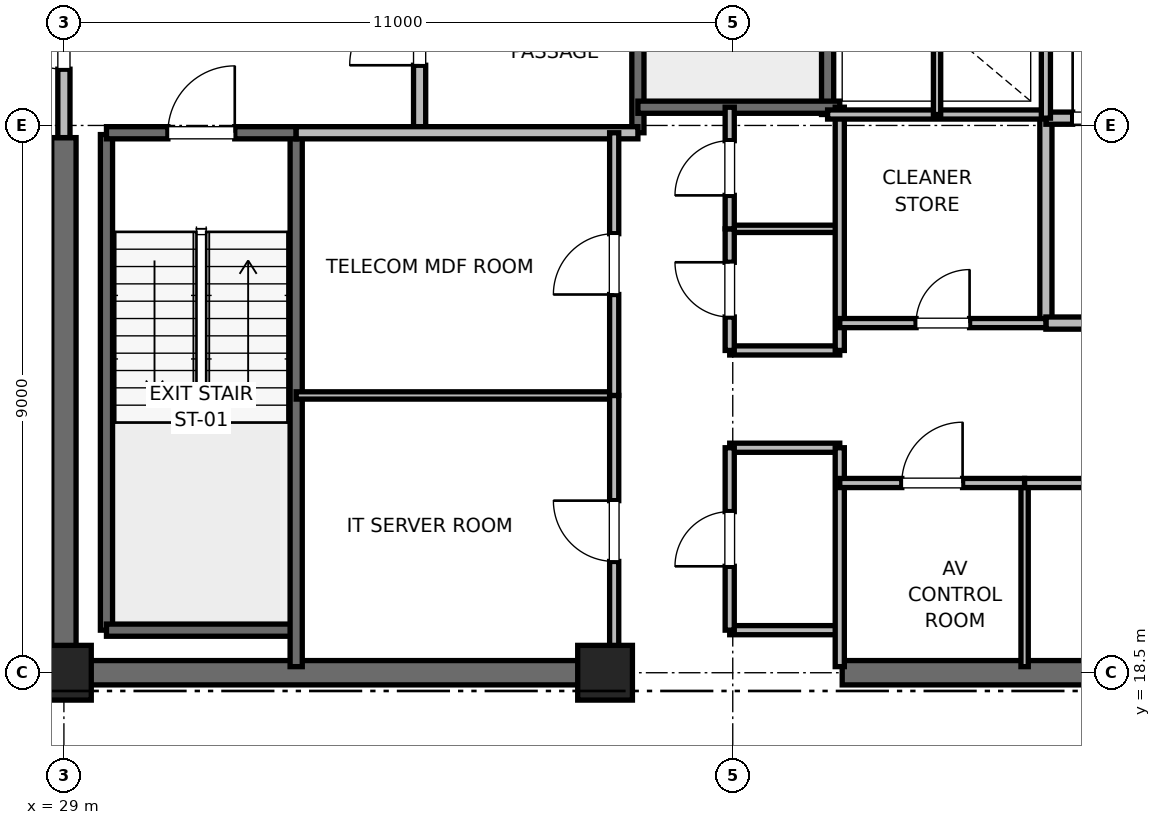
"""IFC4 building model, lengths in metres.
Left out: names, types, materials, properties, quantities, classifications, styles, units other than length and angle.
Written with IfcOpenShell. Run it as: python <this file> out.ifc"""

import sys

from ifc_helpers import new_model, si_unit, direction, frame, frame_2d, origin, origin_2d, place, context, subcontext, project, spatial, rectangle, extrude, element, fill, save


model = new_model("IFC4")
c1 = context("Model", 3, precision=1e-05, world=origin(), true_north=direction((0.0, 1.0)))
c2 = subcontext(c1, "Body", "Model", "MODEL_VIEW")
j1 = project(units=[si_unit("LENGTHUNIT", "METRE"), si_unit("PLANEANGLEUNIT", "RADIAN")], contexts=[c1])
p1 = place(None, origin())
s1 = spatial("IfcSite", under=j1, at=p1, CompositionType="ELEMENT")
p2 = place(p1, origin())
s2 = spatial("IfcBuilding", under=s1, at=p2, CompositionType="ELEMENT")
p3 = place(p2, frame((0.0, 0.0, 314.8)))
s3 = spatial("IfcBuildingStorey", under=s2, at=p3, CompositionType="ELEMENT", Elevation=314.8)
for number, where, z_axis, x_axis in (
    (1, (29.0, 18.5, 0.0), (0.0, 0.0, 1.0), (1.0, 0.0, 0.0)),
    (2, (37.9, 18.5, 0.0), (0.0, 0.0, 1.0), (1.0, 0.0, 0.0)),
):
    element("IfcColumn", number, at=place(p3, frame(where, z_axis=z_axis, x_axis=x_axis)), inside=s3, PredefinedType="PILASTER", context=c2, shape_type="SweptSolid", body=[
        extrude(rectangle(XDim=0.9, YDim=0.9, at=origin_2d()), origin(), (0.0, 0.0, 1.0), 4.0),
    ])
for number, where, z_axis, x_axis in (
    (3, (29.0, 18.5, 0.0), (0.0, 0.0, 1.0), (1.0, 0.0, 0.0)),
    (4, (41.8, 18.5, 0.0), (0.0, 0.0, 1.0), (1.0, 0.0, 0.0)),
):
    element("IfcWall", number, at=place(p3, frame(where, z_axis=z_axis, x_axis=x_axis)), inside=s3, PredefinedType="SHEAR", context=c2, shape_type="SweptSolid", body=[
        extrude(rectangle(XDim=9.2, YDim=0.4, at=frame_2d((4.6, 0.0))), origin(), (0.0, 0.0, 1.0), 3.785),
    ])
p4 = place(p3, frame((29.0, 18.5, 0.0), z_axis=(0.0, 0.0, 1.0), x_axis=(0.0, 1.0, 0.0)))
e5 = element("IfcWall", 5, at=p4, inside=s3, PredefinedType="SHEAR", context=c2, shape_type="SweptSolid", body=[
    extrude(rectangle(XDim=8.8, YDim=0.4, at=frame_2d((4.4, 0.0))), origin(), (0.0, 0.0, 1.0), 3.785),
])
p5 = place(p3, frame((29.7, 19.2, 0.0), z_axis=(0.0, 0.0, 1.0), x_axis=(0.0, 1.0, 0.0)))
e6 = element("IfcWall", 6, at=p5, inside=s3, PredefinedType="SOLIDWALL", context=c2, shape_type="SweptSolid", body=[
    extrude(rectangle(XDim=8.15, YDim=0.2, at=frame_2d((4.075, 0.0))), origin(), (0.0, 0.0, 1.0), 3.785),
])
p6 = place(p3, frame((29.7, 19.2, 0.0), z_axis=(0.0, 0.0, 1.0), x_axis=(1.0, 0.0, 0.0)))
e7 = element("IfcWall", 7, at=p6, inside=s3, PredefinedType="SOLIDWALL", context=c2, shape_type="SweptSolid", body=[
    extrude(rectangle(XDim=3.12, YDim=0.2, at=frame_2d((1.56, 0.0))), origin(), (0.0, 0.0, 1.0), 3.785),
])
p7 = place(p3, frame((32.82, 18.6, 0.0), z_axis=(0.0, 0.0, 1.0), x_axis=(0.0, 1.0, 0.0)))
e8 = element("IfcWall", 8, at=p7, inside=s3, PredefinedType="SOLIDWALL", context=c2, shape_type="SweptSolid", body=[
    extrude(rectangle(XDim=8.78, YDim=0.2, at=frame_2d((4.39, 0.0))), origin(), (0.0, 0.0, 1.0), 3.785),
])
p8 = place(p3, frame((29.7, 27.38, 0.0), z_axis=(0.0, 0.0, 1.0), x_axis=(1.0, 0.0, 0.0)))
e9 = element("IfcWall", 9, at=p8, inside=s3, PredefinedType="SOLIDWALL", context=c2, shape_type="SweptSolid", body=[
    extrude(rectangle(XDim=3.12, YDim=0.2, at=frame_2d((1.56, 0.0))), origin(), (0.0, 0.0, 1.0), 3.785),
])
p9 = place(p8, frame((1.01, 0.0, 0.0)))
e10 = element("IfcOpeningElement", 10, at=p9, cuts=e9, PredefinedType="OPENING", context=c2, shape_type="SweptSolid", body=[
    extrude(rectangle(XDim=1.1, YDim=2.15, at=frame_2d((0.55, 1.075))), frame((0.0, 0.1, 0.0), z_axis=(0.0, -1.0, 0.0), x_axis=(1.0, 0.0, 0.0)), (0.0, 0.0, 1.0), 0.2),
])
p10 = place(p3, frame((38.44, 27.38, 0.0), z_axis=(0.0, 0.0, 1.0), x_axis=(0.0, 1.0, 0.0)))
e11 = element("IfcWall", 11, at=p10, inside=s3, PredefinedType="SOLIDWALL", context=c2, shape_type="SweptSolid", body=[
    extrude(rectangle(XDim=8.87, YDim=0.2, at=frame_2d((4.435, 0.0))), origin(), (0.0, 0.0, 1.0), 3.785),
])
p11 = place(p3, frame((41.56, 27.68, 0.0), z_axis=(0.0, 0.0, 1.0), x_axis=(0.0, 1.0, 0.0)))
e12 = element("IfcWall", 12, at=p11, inside=s3, PredefinedType="SOLIDWALL", context=c2, shape_type="SweptSolid", body=[
    extrude(rectangle(XDim=8.57, YDim=0.2, at=frame_2d((4.285, 0.0))), origin(), (0.0, 0.0, 1.0), 3.785),
])
p12 = place(p3, frame((38.44, 27.8, 0.0), z_axis=(0.0, 0.0, 1.0), x_axis=(1.0, 0.0, 0.0)))
e13 = element("IfcWall", 13, at=p12, inside=s3, PredefinedType="SOLIDWALL", context=c2, shape_type="SweptSolid", body=[
    extrude(rectangle(XDim=3.32, YDim=0.2, at=frame_2d((1.66, 0.0))), origin(), (0.0, 0.0, 1.0), 3.785),
])
p13 = place(p3, frame((34.85, 27.38, 0.0), z_axis=(0.0, 0.0, 1.0), x_axis=(0.0, 1.0, 0.0)))
e14 = element("IfcWall", 14, at=p13, inside=s3, PredefinedType="PARTITIONING", context=c2, shape_type="SweptSolid", body=[
    extrude(rectangle(XDim=3.37, YDim=0.2, at=frame_2d((1.685, 0.0))), origin(), (0.0, 0.0, 1.0), 3.785),
])
p14 = place(p13, frame((1.11, 0.0, 0.0)))
e15 = element("IfcOpeningElement", 15, at=p14, cuts=e14, PredefinedType="OPENING", context=c2, shape_type="SweptSolid", body=[
    extrude(rectangle(XDim=1.15, YDim=2.2, at=frame_2d((0.575, 1.1))), frame((0.0, 0.1, 0.0), z_axis=(0.0, -1.0, 0.0), x_axis=(1.0, 0.0, 0.0)), (0.0, 0.0, 1.0), 0.2),
])
p15 = place(p3, frame((29.0, 27.3, 0.0), z_axis=(0.0, 0.0, 1.0), x_axis=(0.0, 1.0, 0.0)))
e16 = element("IfcWall", 16, at=p15, inside=s3, PredefinedType="PARTITIONING", context=c2, shape_type="SweptSolid", body=[
    extrude(rectangle(XDim=3.4, YDim=0.2, at=frame_2d((1.7, 0.0))), origin(), (0.0, 0.0, 1.0), 2.865),
])
p16 = place(p15, frame((1.125, 0.0, 0.0)))
e17 = element("IfcOpeningElement", 17, at=p16, cuts=e16, PredefinedType="OPENING", context=c2, shape_type="SweptSolid", body=[
    extrude(rectangle(XDim=1.15, YDim=2.2, at=frame_2d((0.575, 1.1))), frame((0.0, 0.1, 0.0), z_axis=(0.0, -1.0, 0.0), x_axis=(1.0, 0.0, 0.0)), (0.0, 0.0, 1.0), 0.2),
])
p17 = place(p3, frame((32.82, 27.38, 0.0), z_axis=(0.0, 0.0, 1.0), x_axis=(1.0, 0.0, 0.0)))
e18 = element("IfcWall", 18, at=p17, inside=s3, PredefinedType="PARTITIONING", context=c2, shape_type="SweptSolid", body=[
    extrude(rectangle(XDim=5.62, YDim=0.2, at=frame_2d((2.81, 0.0))), origin(), (0.0, 0.0, 1.0), 3.785),
])
p18 = place(p3, frame((45.15, 24.25, 0.0), z_axis=(0.0, 0.0, 1.0), x_axis=(0.0, 1.0, 0.0)))
e19 = element("IfcWall", 19, at=p18, inside=s3, PredefinedType="PARTITIONING", context=c2, shape_type="SweptSolid", body=[
    extrude(rectangle(XDim=3.37, YDim=0.2, at=frame_2d((1.685, 0.0))), origin(), (0.0, 0.0, 1.0), 3.785),
])
p19 = place(p3, frame((45.15, 24.25, 0.0), z_axis=(0.0, 0.0, 1.0), x_axis=(1.0, 0.0, 0.0)))
e20 = element("IfcWall", 20, at=p19, inside=s3, PredefinedType="PARTITIONING", context=c2, shape_type="SweptSolid", body=[
    extrude(rectangle(XDim=2.7, YDim=0.2, at=frame_2d((1.35, 0.0))), origin(), (0.0, 0.0, 1.0), 3.785),
])
p20 = place(p19, frame((0.775, 0.0, 0.0)))
e21 = element("IfcOpeningElement", 21, at=p20, cuts=e20, PredefinedType="OPENING", context=c2, shape_type="SweptSolid", body=[
    extrude(rectangle(XDim=1.15, YDim=2.2, at=frame_2d((0.575, 1.1))), frame((0.0, 0.1, 0.0), z_axis=(0.0, -1.0, 0.0), x_axis=(1.0, 0.0, 0.0)), (0.0, 0.0, 1.0), 0.2),
])
p21 = place(p3, frame((45.15, 27.62, 0.0), z_axis=(0.0, 0.0, 1.0), x_axis=(1.0, 0.0, 0.0)))
e22 = element("IfcWall", 22, at=p21, inside=s3, PredefinedType="PARTITIONING", context=c2, shape_type="SweptSolid", body=[
    extrude(rectangle(XDim=2.03, YDim=0.2, at=frame_2d((1.015, 0.0))), origin(), (0.0, 0.0, 1.0), 3.785),
])
p22 = place(p21, frame((0.44, 0.0, 0.0)))
e23 = element("IfcOpeningElement", 23, at=p22, cuts=e22, PredefinedType="OPENING", context=c2, shape_type="SweptSolid", body=[
    extrude(rectangle(XDim=1.15, YDim=2.2, at=frame_2d((0.575, 1.1))), frame((0.0, 0.1, 0.0), z_axis=(0.0, -1.0, 0.0), x_axis=(1.0, 0.0, 0.0)), (0.0, 0.0, 1.0), 0.2),
])
for number, where, z_axis, x_axis in (
    (24, (39.95, 19.2, 0.0), (0.0, 0.0, 1.0), (1.0, 0.0, 0.0)),
    (25, (39.95, 22.2, 0.0), (0.0, 0.0, 1.0), (1.0, 0.0, 0.0)),
    (26, (39.95, 23.8, 0.0), (0.0, 0.0, 1.0), (1.0, 0.0, 0.0)),
):
    element("IfcWall", number, at=place(p3, frame(where, z_axis=z_axis, x_axis=x_axis)), inside=s3, PredefinedType="PARTITIONING", context=c2, shape_type="SweptSolid", body=[
        extrude(rectangle(XDim=1.81, YDim=0.15, at=frame_2d((0.905, 0.0))), origin(), (0.0, 0.0, 1.0), 2.85),
    ])
p23 = place(p3, frame((39.95, 25.8, 0.0), z_axis=(0.0, 0.0, 1.0), x_axis=(1.0, 0.0, 0.0)))
e27 = element("IfcWall", 27, at=p23, inside=s3, PredefinedType="PARTITIONING", context=c2, shape_type="SweptSolid", body=[
    extrude(rectangle(XDim=1.81, YDim=0.12, at=frame_2d((0.905, 0.0))), origin(), (0.0, 0.0, 1.0), 2.85),
])
p24 = place(p3, frame((41.76, 18.6, 0.0), z_axis=(0.0, 0.0, 1.0), x_axis=(0.0, 1.0, 0.0)))
e28 = element("IfcWall", 28, at=p24, inside=s3, PredefinedType="PARTITIONING", context=c2, shape_type="SweptSolid", body=[
    extrude(rectangle(XDim=3.6, YDim=0.15, at=frame_2d((1.8, 0.0))), origin(), (0.0, 0.0, 1.0), 2.85),
])
p25 = place(p3, frame((41.76, 23.8, 0.0), z_axis=(0.0, 0.0, 1.0), x_axis=(0.0, 1.0, 0.0)))
e29 = element("IfcWall", 29, at=p25, inside=s3, PredefinedType="PARTITIONING", context=c2, shape_type="SweptSolid", body=[
    extrude(rectangle(XDim=4.0, YDim=0.15, at=frame_2d((2.0, 0.0))), origin(), (0.0, 0.0, 1.0), 2.85),
])
p26 = place(p3, frame((39.95, 19.2, 0.0), z_axis=(0.0, 0.0, 1.0), x_axis=(0.0, 1.0, 0.0)))
e30 = element("IfcWall", 30, at=p26, inside=s3, PredefinedType="PARTITIONING", context=c2, shape_type="SweptSolid", body=[
    extrude(rectangle(XDim=3.0, YDim=0.15, at=frame_2d((1.5, 0.0))), origin(), (0.0, 0.0, 1.0), 2.85),
])
p27 = place(p26, frame((1.05, 0.0, 0.0)))
e31 = element("IfcOpeningElement", 31, at=p27, cuts=e30, PredefinedType="OPENING", context=c2, shape_type="SweptSolid", body=[
    extrude(rectangle(XDim=0.9, YDim=2.1, at=frame_2d((0.45, 1.05))), frame((0.0, 0.075, 0.0), z_axis=(0.0, -1.0, 0.0), x_axis=(1.0, 0.0, 0.0)), (0.0, 0.0, 1.0), 0.15),
])
p28 = place(p3, frame((39.95, 23.8, 0.0), z_axis=(0.0, 0.0, 1.0), x_axis=(0.0, 1.0, 0.0)))
e32 = element("IfcWall", 32, at=p28, inside=s3, PredefinedType="PARTITIONING", context=c2, shape_type="SweptSolid", body=[
    extrude(rectangle(XDim=2.0, YDim=0.15, at=frame_2d((1.0, 0.0))), origin(), (0.0, 0.0, 1.0), 2.85),
])
p29 = place(p28, frame((0.55, 0.0, 0.0)))
e33 = element("IfcOpeningElement", 33, at=p29, cuts=e32, PredefinedType="OPENING", context=c2, shape_type="SweptSolid", body=[
    extrude(rectangle(XDim=0.9, YDim=2.1, at=frame_2d((0.45, 1.05))), frame((0.0, 0.075, 0.0), z_axis=(0.0, -1.0, 0.0), x_axis=(1.0, 0.0, 0.0)), (0.0, 0.0, 1.0), 0.15),
])
p30 = place(p3, frame((39.95, 25.8, 0.0), z_axis=(0.0, 0.0, 1.0), x_axis=(0.0, 1.0, 0.0)))
e34 = element("IfcWall", 34, at=p30, inside=s3, PredefinedType="PARTITIONING", context=c2, shape_type="SweptSolid", body=[
    extrude(rectangle(XDim=2.0, YDim=0.15, at=frame_2d((1.0, 0.0))), origin(), (0.0, 0.0, 1.0), 2.85),
])
p31 = place(p30, frame((0.55, 0.0, 0.0)))
e35 = element("IfcOpeningElement", 35, at=p31, cuts=e34, PredefinedType="OPENING", context=c2, shape_type="SweptSolid", body=[
    extrude(rectangle(XDim=0.9, YDim=2.1, at=frame_2d((0.45, 1.05))), frame((0.0, 0.075, 0.0), z_axis=(0.0, -1.0, 0.0), x_axis=(1.0, 0.0, 0.0)), (0.0, 0.0, 1.0), 0.15),
])
p32 = place(p3, frame((32.82, 23.06, 0.0), z_axis=(0.0, 0.0, 1.0), x_axis=(1.0, 0.0, 0.0)))
e36 = element("IfcWall", 36, at=p32, inside=s3, PredefinedType="PARTITIONING", context=c2, shape_type="SweptSolid", body=[
    extrude(rectangle(XDim=5.23, YDim=0.12, at=frame_2d((2.615, 0.0))), origin(), (0.0, 0.0, 1.0), 2.85),
])
p33 = place(p3, frame((38.05, 18.6, 0.0), z_axis=(0.0, 0.0, 1.0), x_axis=(0.0, 1.0, 0.0)))
e37 = element("IfcWall", 37, at=p33, inside=s3, PredefinedType="PARTITIONING", context=c2, shape_type="SweptSolid", body=[
    extrude(rectangle(XDim=4.46, YDim=0.15, at=frame_2d((2.23, 0.0))), origin(), (0.0, 0.0, 1.0), 2.85),
])
p34 = place(p33, frame((1.73, 0.0, 0.0)))
e38 = element("IfcOpeningElement", 38, at=p34, cuts=e37, PredefinedType="OPENING", context=c2, shape_type="SweptSolid", body=[
    extrude(rectangle(XDim=1.0, YDim=2.15, at=frame_2d((0.5, 1.075))), frame((0.0, 0.075, 0.0), z_axis=(0.0, -1.0, 0.0), x_axis=(1.0, 0.0, 0.0)), (0.0, 0.0, 1.0), 0.15),
])
p35 = place(p3, frame((38.05, 23.06, 0.0), z_axis=(0.0, 0.0, 1.0), x_axis=(0.0, 1.0, 0.0)))
e39 = element("IfcWall", 39, at=p35, inside=s3, PredefinedType="PARTITIONING", context=c2, shape_type="SweptSolid", body=[
    extrude(rectangle(XDim=4.32, YDim=0.15, at=frame_2d((2.16, 0.0))), origin(), (0.0, 0.0, 1.0), 2.85),
])
p36 = place(p35, frame((1.66, 0.0, 0.0)))
e40 = element("IfcOpeningElement", 40, at=p36, cuts=e39, PredefinedType="OPENING", context=c2, shape_type="SweptSolid", body=[
    extrude(rectangle(XDim=1.0, YDim=2.15, at=frame_2d((0.5, 1.075))), frame((0.0, 0.075, 0.0), z_axis=(0.0, -1.0, 0.0), x_axis=(1.0, 0.0, 0.0)), (0.0, 0.0, 1.0), 0.15),
])
p37 = place(p3, frame((41.56, 27.68, 0.0), z_axis=(0.0, 0.0, 1.0), x_axis=(1.0, 0.0, 0.0)))
e41 = element("IfcWall", 41, at=p37, inside=s3, PredefinedType="PARTITIONING", context=c2, shape_type="SweptSolid", body=[
    extrude(rectangle(XDim=3.59, YDim=0.15, at=frame_2d((1.795, 0.0))), origin(), (0.0, 0.0, 1.0), 2.85),
])
p38 = place(p3, frame((44.8, 18.6, 0.0), z_axis=(0.0, 0.0, 1.0), x_axis=(0.0, 1.0, 0.0)))
e42 = element("IfcWall", 42, at=p38, inside=s3, PredefinedType="PARTITIONING", context=c2, shape_type="SweptSolid", body=[
    extrude(rectangle(XDim=3.02, YDim=0.12, at=frame_2d((1.51, 0.0))), origin(), (0.0, 0.0, 1.0), 2.85),
])
p39 = place(p3, frame((41.76, 21.62, 0.0), z_axis=(0.0, 0.0, 1.0), x_axis=(1.0, 0.0, 0.0)))
e43 = element("IfcWall", 43, at=p39, inside=s3, PredefinedType="PARTITIONING", context=c2, shape_type="SweptSolid", body=[
    extrude(rectangle(XDim=3.04, YDim=0.15, at=frame_2d((1.52, 0.0))), origin(), (0.0, 0.0, 1.0), 2.85),
])
p40 = place(p39, frame((1.02, 0.0, 0.0)))
e44 = element("IfcOpeningElement", 44, at=p40, cuts=e43, PredefinedType="OPENING", context=c2, shape_type="SweptSolid", body=[
    extrude(rectangle(XDim=1.0, YDim=2.15, at=frame_2d((0.5, 1.075))), frame((0.0, 0.075, 0.0), z_axis=(0.0, -1.0, 0.0), x_axis=(1.0, 0.0, 0.0)), (0.0, 0.0, 1.0), 0.15),
])
p41 = place(p3, frame((44.8, 21.62, 0.0), z_axis=(0.0, 0.0, 1.0), x_axis=(1.0, 0.0, 0.0)))
e45 = element("IfcWall", 45, at=p41, inside=s3, PredefinedType="PARTITIONING", context=c2, shape_type="SweptSolid", body=[
    extrude(rectangle(XDim=2.94, YDim=0.15, at=frame_2d((1.47, 0.0))), origin(), (0.0, 0.0, 1.0), 2.85),
])
p42 = place(p41, frame((0.97, 0.0, 0.0)))
e46 = element("IfcOpeningElement", 46, at=p42, cuts=e45, PredefinedType="OPENING", context=c2, shape_type="SweptSolid", body=[
    extrude(rectangle(XDim=1.0, YDim=2.15, at=frame_2d((0.5, 1.075))), frame((0.0, 0.075, 0.0), z_axis=(0.0, -1.0, 0.0), x_axis=(1.0, 0.0, 0.0)), (0.0, 0.0, 1.0), 0.15),
])
p43 = place(p3, frame((41.76, 24.25, 0.0), z_axis=(0.0, 0.0, 1.0), x_axis=(1.0, 0.0, 0.0)))
e47 = element("IfcWall", 47, at=p43, inside=s3, PredefinedType="PARTITIONING", context=c2, shape_type="SweptSolid", body=[
    extrude(rectangle(XDim=3.39, YDim=0.15, at=frame_2d((1.695, 0.0))), origin(), (0.0, 0.0, 1.0), 2.85),
])
p44 = place(p43, frame((1.255, 0.0, 0.0)))
e48 = element("IfcOpeningElement", 48, at=p44, cuts=e47, PredefinedType="OPENING", context=c2, shape_type="SweptSolid", body=[
    extrude(rectangle(XDim=0.88, YDim=2.1, at=frame_2d((0.44, 1.05))), frame((0.0, 0.075, 0.0), z_axis=(0.0, -1.0, 0.0), x_axis=(1.0, 0.0, 0.0)), (0.0, 0.0, 1.0), 0.15),
])
p45 = place(p3, frame((45.15, 27.62, 0.0), z_axis=(0.0, 0.0, 1.0), x_axis=(0.0, 1.0, 0.0)))
e49 = element("IfcWall", 49, at=p45, inside=s3, PredefinedType="PARTITIONING", context=c2, shape_type="SweptSolid", body=[
    extrude(rectangle(XDim=3.1, YDim=0.15, at=frame_2d((1.55, 0.0))), origin(), (0.0, 0.0, 1.0), 2.85),
])
p46 = place(p3, frame((43.36, 27.68, 0.0), z_axis=(0.0, 0.0, 1.0), x_axis=(0.0, 1.0, 0.0)))
e50 = element("IfcWall", 50, at=p46, inside=s3, PredefinedType="PARTITIONING", context=c2, shape_type="SweptSolid", body=[
    extrude(rectangle(XDim=3.04, YDim=0.12, at=frame_2d((1.52, 0.0))), origin(), (0.0, 0.0, 1.0), 2.85),
])
p47 = place(p9, origin())
e51 = element("IfcDoor", 51, at=p47, inside=s3, OperationType="SINGLE_SWING_RIGHT", PredefinedType="DOOR", context=c2, shape_type="SweptSolid", body=[
    extrude(rectangle(XDim=1.1, YDim=2.15, at=frame_2d((0.55, 1.075))), frame((0.0, 0.025, 0.0), z_axis=(0.0, -1.0, 0.0), x_axis=(1.0, 0.0, 0.0)), (0.0, 0.0, 1.0), 0.05),
])
fill(e10, e51)
p48 = place(p14, origin())
e52 = element("IfcDoor", 52, at=p48, inside=s3, OperationType="SINGLE_SWING_LEFT", PredefinedType="DOOR", context=c2, shape_type="SweptSolid", body=[
    extrude(rectangle(XDim=1.15, YDim=2.2, at=frame_2d((0.575, 1.1))), frame((0.0, 0.025, 0.0), z_axis=(0.0, -1.0, 0.0), x_axis=(1.0, 0.0, 0.0)), (0.0, 0.0, 1.0), 0.05),
])
fill(e15, e52)
p49 = place(p16, origin())
e53 = element("IfcDoor", 53, at=p49, inside=s3, OperationType="SINGLE_SWING_RIGHT", PredefinedType="DOOR", context=c2, shape_type="SweptSolid", body=[
    extrude(rectangle(XDim=1.15, YDim=2.2, at=frame_2d((0.575, 1.1))), frame((0.0, 0.025, 0.0), z_axis=(0.0, -1.0, 0.0), x_axis=(1.0, 0.0, 0.0)), (0.0, 0.0, 1.0), 0.05),
])
fill(e17, e53)
p50 = place(p22, origin())
e54 = element("IfcDoor", 54, at=p50, inside=s3, OperationType="SINGLE_SWING_LEFT", PredefinedType="DOOR", context=c2, shape_type="SweptSolid", body=[
    extrude(rectangle(XDim=1.15, YDim=2.2, at=frame_2d((0.575, 1.1))), frame((0.0, 0.025, 0.0), z_axis=(0.0, -1.0, 0.0), x_axis=(1.0, 0.0, 0.0)), (0.0, 0.0, 1.0), 0.05),
])
fill(e23, e54)
p51 = place(p27, origin())
e55 = element("IfcDoor", 55, at=p51, inside=s3, OperationType="SINGLE_SWING_LEFT", PredefinedType="DOOR", context=c2, shape_type="SweptSolid", body=[
    extrude(rectangle(XDim=0.9, YDim=2.1, at=frame_2d((0.45, 1.05))), frame((0.0, 0.025, 0.0), z_axis=(0.0, -1.0, 0.0), x_axis=(1.0, 0.0, 0.0)), (0.0, 0.0, 1.0), 0.05),
])
fill(e31, e55)
p52 = place(p29, origin())
e56 = element("IfcDoor", 56, at=p52, inside=s3, OperationType="SINGLE_SWING_RIGHT", PredefinedType="DOOR", context=c2, shape_type="SweptSolid", body=[
    extrude(rectangle(XDim=0.9, YDim=2.1, at=frame_2d((0.45, 1.05))), frame((0.0, 0.025, 0.0), z_axis=(0.0, -1.0, 0.0), x_axis=(1.0, 0.0, 0.0)), (0.0, 0.0, 1.0), 0.05),
])
fill(e33, e56)
p53 = place(p31, origin())
e57 = element("IfcDoor", 57, at=p53, inside=s3, OperationType="SINGLE_SWING_LEFT", PredefinedType="DOOR", context=c2, shape_type="SweptSolid", body=[
    extrude(rectangle(XDim=0.9, YDim=2.1, at=frame_2d((0.45, 1.05))), frame((0.0, 0.025, 0.0), z_axis=(0.0, -1.0, 0.0), x_axis=(1.0, 0.0, 0.0)), (0.0, 0.0, 1.0), 0.05),
])
fill(e35, e57)
p54 = place(p34, origin())
e58 = element("IfcDoor", 58, at=p54, inside=s3, OperationType="SINGLE_SWING_RIGHT", PredefinedType="DOOR", context=c2, shape_type="SweptSolid", body=[
    extrude(rectangle(XDim=1.0, YDim=2.15, at=frame_2d((0.5, 1.075))), frame((0.0, 0.025, 0.0), z_axis=(0.0, -1.0, 0.0), x_axis=(1.0, 0.0, 0.0)), (0.0, 0.0, 1.0), 0.05),
])
fill(e38, e58)
p55 = place(p36, origin())
e59 = element("IfcDoor", 59, at=p55, inside=s3, OperationType="SINGLE_SWING_LEFT", PredefinedType="DOOR", context=c2, shape_type="SweptSolid", body=[
    extrude(rectangle(XDim=1.0, YDim=2.15, at=frame_2d((0.5, 1.075))), frame((0.0, 0.025, 0.0), z_axis=(0.0, -1.0, 0.0), x_axis=(1.0, 0.0, 0.0)), (0.0, 0.0, 1.0), 0.05),
])
fill(e40, e59)
p56 = place(p40, origin())
e60 = element("IfcDoor", 60, at=p56, inside=s3, OperationType="SINGLE_SWING_RIGHT", PredefinedType="DOOR", context=c2, shape_type="SweptSolid", body=[
    extrude(rectangle(XDim=1.0, YDim=2.15, at=frame_2d((0.5, 1.075))), frame((0.0, 0.025, 0.0), z_axis=(0.0, -1.0, 0.0), x_axis=(1.0, 0.0, 0.0)), (0.0, 0.0, 1.0), 0.05),
])
fill(e44, e60)
p57 = place(p44, origin())
e61 = element("IfcDoor", 61, at=p57, inside=s3, OperationType="SINGLE_SWING_RIGHT", PredefinedType="DOOR", context=c2, shape_type="SweptSolid", body=[
    extrude(rectangle(XDim=0.88, YDim=2.1, at=frame_2d((0.44, 1.05))), frame((0.0, 0.025, 0.0), z_axis=(0.0, -1.0, 0.0), x_axis=(1.0, 0.0, 0.0)), (0.0, 0.0, 1.0), 0.05),
])
fill(e48, e61)
save(model, sys.argv[1])
